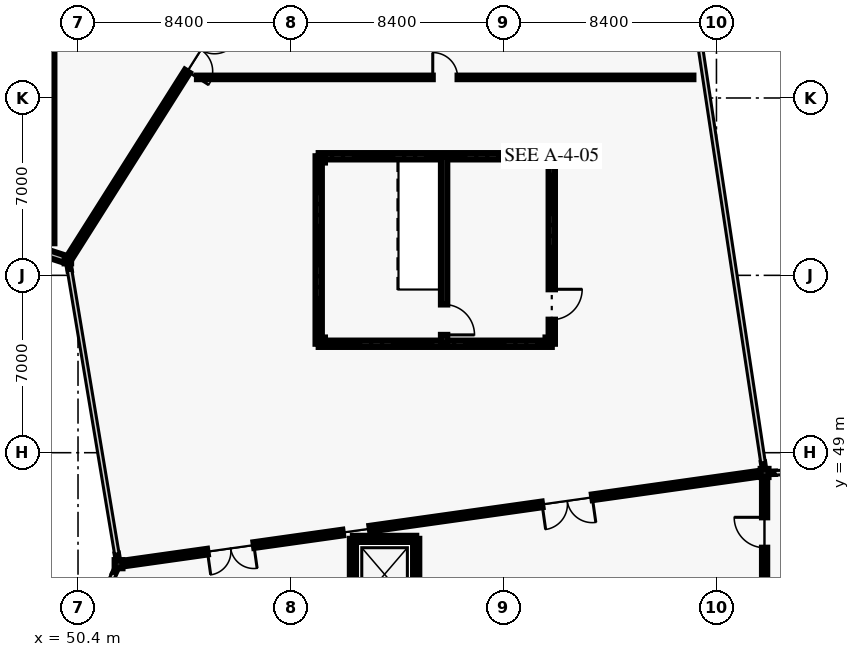
"""IFC4 building model, lengths in metres.
Left out: names, types, materials, properties, quantities, classifications, styles, units other than length and angle.
Written with IfcOpenShell. Run it as: python <this file> out.ifc"""

import sys

from ifc_helpers import new_model, si_unit, direction, frame, frame_2d, origin, origin_2d, place, context, subcontext, project, spatial, rectangle, i_section, extrude, element, fill, save


model = new_model("IFC4")
c1 = context("Model", 3, precision=1e-05, world=origin(), true_north=direction((0.0, 1.0)))
c2 = subcontext(c1, "Body", "Model", "MODEL_VIEW")
j1 = project(units=[si_unit("LENGTHUNIT", "METRE"), si_unit("PLANEANGLEUNIT", "RADIAN")], contexts=[c1])
p1 = place(None, origin())
s1 = spatial("IfcSite", under=j1, at=p1, CompositionType="ELEMENT")
p2 = place(p1, origin())
s2 = spatial("IfcBuilding", under=s1, at=p2, CompositionType="ELEMENT")
p3 = place(p2, frame((0.0, 0.0, 15.0)))
s3 = spatial("IfcBuildingStorey", under=s2, at=p3, CompositionType="ELEMENT", Elevation=15.0)
p4 = place(p3, frame((50.0, 56.6, 0.0), z_axis=(0.0, 0.0, 1.0), x_axis=(1.0, 0.0, 0.0)))
e1 = element("IfcColumn", 1, at=p4, inside=s3, PredefinedType="COLUMN", context=c2, shape_type="SweptSolid", body=[
    extrude(i_section(OverallWidth=0.254, OverallDepth=0.254, WebThickness=0.009, FlangeThickness=0.014, FilletRadius=0.013, at=origin_2d()), origin(), (0.0, 0.0, 1.0), 4.8),
])
for number, where, z_axis, x_axis in (
    (2, (52.0, 44.6, 0.0), (0.0, 0.0, 1.0), (1.0, 0.0, 0.0)),
    (3, (77.5, 48.2, 0.0), (0.0, 0.0, 1.0), (1.0, 0.0, 0.0)),
):
    element("IfcColumn", number, at=place(p3, frame(where, z_axis=z_axis, x_axis=x_axis)), inside=s3, PredefinedType="COLUMN", context=c2, shape_type="SweptSolid", body=[
        extrude(i_section(OverallWidth=0.309, OverallDepth=0.321, WebThickness=0.014, FlangeThickness=0.022, FilletRadius=0.017, at=origin_2d()), origin(), (0.0, 0.0, 1.0), 4.8),
    ])
for number, where, z_axis, x_axis in (
    (4, (60.02, 53.42, 0.0), (0.0, 0.0, 1.0), (1.0, 0.0, 0.0)),
    (5, (68.98, 53.42, 0.0), (0.0, 0.0, 1.0), (1.0, 0.0, 0.0)),
    (6, (68.98, 60.58, 0.0), (0.0, 0.0, 1.0), (1.0, 0.0, 0.0)),
    (7, (60.02, 60.58, 0.0), (0.0, 0.0, 1.0), (1.0, 0.0, 0.0)),
):
    element("IfcColumn", number, at=place(p3, frame(where, z_axis=z_axis, x_axis=x_axis)), inside=s3, PredefinedType="COLUMN", context=c2, shape_type="SweptSolid", body=[
        extrude(i_section(OverallWidth=0.254, OverallDepth=0.254, WebThickness=0.009, FlangeThickness=0.014, FilletRadius=0.013, at=origin_2d()), origin(), (0.0, 0.0, 1.0), 4.8),
    ])
p5 = place(p3, frame((51.825, 44.229, 0.0), z_axis=(0.0, 0.0, 1.0), x_axis=(0.425224932958, 0.905087706463, 0.0)))
e8 = element("IfcWall", 8, at=p5, inside=s3, PredefinedType="SOLIDWALL", context=c2, shape_type="SweptSolid", body=[
    extrude(rectangle(XDim=0.308, YDim=0.095, at=frame_2d((0.154, 0.0))), origin(), (0.0, 0.0, 1.0), 3.62),
])
p6 = place(p3, frame((77.602, 48.202, 0.0), z_axis=(0.0, 0.0, 1.0), x_axis=(0.999735659566, 0.022991541735, 0.0)))
e9 = element("IfcWall", 9, at=p6, inside=s3, PredefinedType="SOLIDWALL", context=c2, shape_type="SweptSolid", body=[
    extrude(rectangle(XDim=0.308, YDim=0.095, at=frame_2d((0.154, 0.0))), origin(), (0.0, 0.0, 1.0), 3.62),
])
for number, where, z_axis, x_axis in (
    (10, (51.983, 44.7, 0.0), (0.0, 0.0, 1.0), (-0.166, 0.986, 0.0)),
    (11, (50.068, 56.196, 0.0), (0.0, 0.0, 1.0), (-0.166, 0.986, 0.0)),
):
    element("IfcWall", number, at=place(p3, frame(where, z_axis=z_axis, x_axis=x_axis)), inside=s3, PredefinedType="SOLIDWALL", context=c2, shape_type="SweptSolid", body=[
        extrude(rectangle(XDim=0.308, YDim=0.095, at=frame_2d((0.154, 0.0))), origin(), (0.0, 0.0, 1.0), 3.62),
    ])
p7 = place(p3, frame((77.439, 48.605, 0.0), z_axis=(0.0, 0.0, 1.0), x_axis=(0.15008766182, -0.988672692942, 0.0)))
e12 = element("IfcWall", 12, at=p7, inside=s3, PredefinedType="SOLIDWALL", context=c2, shape_type="SweptSolid", body=[
    extrude(rectangle(XDim=0.307, YDim=0.095, at=frame_2d((0.154, 0.0))), origin(), (0.0, 0.0, 1.0), 3.62),
])
p8 = place(p3, frame((49.943, 56.619, 0.0), z_axis=(0.0, 0.0, 1.0), x_axis=(-0.951067694824, 0.308982588283, 0.0)))
e13 = element("IfcWall", 13, at=p8, inside=s3, PredefinedType="SOLIDWALL", context=c2, shape_type="SweptSolid", body=[
    extrude(rectangle(XDim=24.86, YDim=0.29, at=frame_2d((12.43, 0.0))), origin(), (0.0, 0.0, 1.0), 3.62),
])
p9 = place(p3, frame((77.5, 43.5, 0.0), z_axis=(0.0, 0.0, 1.0), x_axis=(0.0, 1.0, 0.0)))
e14 = element("IfcWall", 14, at=p9, inside=s3, PredefinedType="SOLIDWALL", context=c2, shape_type="SweptSolid", body=[
    extrude(rectangle(XDim=4.7, YDim=0.205, at=frame_2d((2.35, 0.0))), origin(), (0.0, 0.0, 1.0), 3.32),
])
p10 = place(p9, frame((1.75, 0.0, 0.0)))
e15 = element("IfcOpeningElement", 15, at=p10, cuts=e14, PredefinedType="OPENING", context=c2, shape_type="SweptSolid", body=[
    extrude(rectangle(XDim=1.2, YDim=2.2, at=frame_2d((0.6, 1.1))), frame((0.0, 0.113, 0.0), z_axis=(0.0, -1.0, 0.0), x_axis=(1.0, 0.0, 0.0)), (0.0, 0.0, 1.0), 0.225),
])
p11 = place(p3, frame((77.5, 48.2, 0.0), z_axis=(0.0, 0.0, 1.0), x_axis=(-0.990181159322, -0.139790098807, 0.0)))
e16 = element("IfcWall", 16, at=p11, inside=s3, PredefinedType="SOLIDWALL", context=c2, shape_type="SweptSolid", body=[
    extrude(rectangle(XDim=15.738, YDim=0.225, at=frame_2d((7.869, 0.0))), origin(), (0.0, 0.0, 1.0), 4.02),
])
p12 = place(p11, frame((6.869, 0.0, 0.0)))
e17 = element("IfcOpeningElement", 17, at=p12, cuts=e16, PredefinedType="OPENING", context=c2, shape_type="SweptSolid", body=[
    extrude(rectangle(XDim=2.0, YDim=2.5, at=frame_2d((1.0, 1.25))), frame((0.0, 0.123, 0.0), z_axis=(0.0, -1.0, 0.0), x_axis=(1.0, 0.0, 0.0)), (0.0, 0.0, 1.0), 0.245),
])
p13 = place(p3, frame((60.85, 45.849, 0.0), z_axis=(0.0, 0.0, 1.0), x_axis=(-0.990187360524, -0.139746166523, 0.0)))
e18 = element("IfcWall", 18, at=p13, inside=s3, PredefinedType="SOLIDWALL", context=c2, shape_type="SweptSolid", body=[
    extrude(rectangle(XDim=8.938, YDim=0.225, at=frame_2d((4.469, 0.0))), origin(), (0.0, 0.0, 1.0), 4.02),
])
p14 = place(p13, frame((3.544, 0.0, 0.0)))
e19 = element("IfcOpeningElement", 19, at=p14, cuts=e18, PredefinedType="OPENING", context=c2, shape_type="SweptSolid", body=[
    extrude(rectangle(XDim=1.85, YDim=2.4, at=frame_2d((0.925, 1.2))), frame((0.0, 0.123, 0.0), z_axis=(0.0, -1.0, 0.0), x_axis=(1.0, 0.0, 0.0)), (0.0, 0.0, 1.0), 0.245),
])
p15 = place(p3, frame((60.5, 73.2, 0.0), z_axis=(0.0, 0.0, 1.0), x_axis=(-0.534570878454, -0.845123645338, 0.0)))
e20 = element("IfcWall", 20, at=p15, inside=s3, PredefinedType="SOLIDWALL", context=c2, shape_type="SweptSolid", body=[
    extrude(rectangle(XDim=19.642, YDim=0.225, at=frame_2d((9.821, 0.0))), origin(), (0.0, 0.0, 1.0), 4.02),
])
p16 = place(p15, frame((8.821, 0.0, 0.0)))
e21 = element("IfcOpeningElement", 21, at=p16, cuts=e20, PredefinedType="OPENING", context=c2, shape_type="SweptSolid", body=[
    extrude(rectangle(XDim=2.0, YDim=2.5, at=frame_2d((1.0, 1.25))), frame((0.0, 0.123, 0.0), z_axis=(0.0, -1.0, 0.0), x_axis=(1.0, 0.0, 0.0)), (0.0, 0.0, 1.0), 0.245),
])
p17 = place(p3, frame((55.095, 63.813, 0.0), z_axis=(0.0, 0.0, 1.0), x_axis=(1.0, 0.0, 0.0)))
e22 = element("IfcWall", 22, at=p17, inside=s3, PredefinedType="PARTITIONING", context=c2, shape_type="SweptSolid", body=[
    extrude(rectangle(XDim=19.595, YDim=0.14, at=frame_2d((9.797, 0.0))), origin(), (0.0, 0.0, 1.0), 3.32),
])
p18 = place(p17, frame((9.307, 0.0, 0.0)))
e23 = element("IfcOpeningElement", 23, at=p18, cuts=e22, PredefinedType="OPENING", context=c2, shape_type="SweptSolid", body=[
    extrude(rectangle(XDim=0.98, YDim=2.15, at=frame_2d((0.49, 1.075))), frame((0.0, 0.08, 0.0), z_axis=(0.0, -1.0, 0.0), x_axis=(1.0, 0.0, 0.0)), (0.0, 0.0, 1.0), 0.16),
])
p19 = place(p3, frame((49.403, 57.267, 0.0), z_axis=(0.0, 0.0, 1.0), x_axis=(0.0, 1.0, 0.0)))
e24 = element("IfcWall", 24, at=p19, inside=s3, PredefinedType="PARTITIONING", context=c2, shape_type="SweptSolid", body=[
    extrude(rectangle(XDim=24.53, YDim=0.13, at=frame_2d((12.265, 0.0))), origin(), (0.0, 0.0, 1.0), 3.32),
])
p20 = place(p19, frame((11.79, 0.0, 0.0)))
e25 = element("IfcOpeningElement", 25, at=p20, cuts=e24, PredefinedType="OPENING", context=c2, shape_type="SweptSolid", body=[
    extrude(rectangle(XDim=0.95, YDim=2.15, at=frame_2d((0.475, 1.075))), frame((0.0, 0.075, 0.0), z_axis=(0.0, -1.0, 0.0), x_axis=(1.0, 0.0, 0.0)), (0.0, 0.0, 1.0), 0.15),
])
p21 = place(p3, frame((59.9, 53.3, 0.0), z_axis=(0.0, 0.0, 1.0), x_axis=(0.0, 1.0, 0.0)))
e26 = element("IfcWall", 26, at=p21, inside=s3, PredefinedType="SHEAR", context=c2, shape_type="SweptSolid", body=[
    extrude(rectangle(XDim=7.4, YDim=0.25, at=frame_2d((3.7, 0.0))), origin(), (0.0, 0.0, 1.0), 4.56),
])
for number, where, z_axis, x_axis in (
    (27, (59.9, 60.7, 0.0), (0.0, 0.0, 1.0), (1.0, 0.0, 0.0)),
    (28, (69.1, 53.3, 0.0), (0.0, 0.0, 1.0), (-1.0, 0.0, 0.0)),
):
    element("IfcWall", number, at=place(p3, frame(where, z_axis=z_axis, x_axis=x_axis)), inside=s3, PredefinedType="SHEAR", context=c2, shape_type="SweptSolid", body=[
        extrude(rectangle(XDim=9.2, YDim=0.25, at=frame_2d((4.6, 0.0))), origin(), (0.0, 0.0, 1.0), 4.56),
    ])
p22 = place(p3, frame((69.1, 60.7, 0.0), z_axis=(0.0, 0.0, 1.0), x_axis=(0.0, -1.0, 0.0)))
e29 = element("IfcWall", 29, at=p22, inside=s3, PredefinedType="SHEAR", context=c2, shape_type="SweptSolid", body=[
    extrude(rectangle(XDim=7.4, YDim=0.25, at=frame_2d((3.7, 0.0))), origin(), (0.0, 0.0, 1.0), 4.56),
])
p23 = place(p22, frame((5.25, 0.0, 0.0)))
e30 = element("IfcOpeningElement", 30, at=p23, cuts=e29, PredefinedType="OPENING", context=c2, shape_type="SweptSolid", body=[
    extrude(rectangle(XDim=1.2, YDim=2.2, at=frame_2d((0.6, 1.1))), frame((0.0, 0.135, 0.0), z_axis=(0.0, -1.0, 0.0), x_axis=(1.0, 0.0, 0.0)), (0.0, 0.0, 1.0), 0.27),
])
p24 = place(p3, frame((64.85, 60.7, 0.0), z_axis=(0.0, 0.0, 1.0), x_axis=(0.0, -1.0, 0.0)))
e31 = element("IfcWall", 31, at=p24, inside=s3, PredefinedType="SHEAR", context=c2, shape_type="SweptSolid", body=[
    extrude(rectangle(XDim=7.4, YDim=0.25, at=frame_2d((3.7, 0.0))), origin(), (0.0, 0.0, 1.0), 4.56),
])
p25 = place(p24, frame((5.85, 0.0, 0.0)))
e32 = element("IfcOpeningElement", 32, at=p25, cuts=e31, PredefinedType="OPENING", context=c2, shape_type="SweptSolid", body=[
    extrude(rectangle(XDim=1.2, YDim=2.2, at=frame_2d((0.6, 1.1))), frame((0.0, 0.135, 0.0), z_axis=(0.0, -1.0, 0.0), x_axis=(1.0, 0.0, 0.0)), (0.0, 0.0, 1.0), 0.27),
])
p26 = place(p3, frame((61.25, 45.6, 0.0), z_axis=(0.0, 0.0, 1.0), x_axis=(1.0, 0.0, 0.0)))
e33 = element("IfcWall", 33, at=p26, inside=s3, PredefinedType="SHEAR", context=c2, shape_type="SweptSolid", body=[
    extrude(rectangle(XDim=2.5, YDim=0.24, at=frame_2d((1.25, 0.0))), origin(), (0.0, 0.0, 1.0), 4.56),
])
for number, where, z_axis, x_axis in (
    (34, (63.75, 45.6, 0.0), (0.0, 0.0, 1.0), (0.0, -1.0, 0.0)),
    (35, (61.25, 42.8, 0.0), (0.0, 0.0, 1.0), (0.0, 1.0, 0.0)),
):
    element("IfcWall", number, at=place(p3, frame(where, z_axis=z_axis, x_axis=x_axis)), inside=s3, PredefinedType="SHEAR", context=c2, shape_type="SweptSolid", body=[
        extrude(rectangle(XDim=2.8, YDim=0.24, at=frame_2d((1.4, 0.0))), origin(), (0.0, 0.0, 1.0), 4.56),
    ])
p27 = place(p10, origin())
e36 = element("IfcDoor", 36, at=p27, inside=s3, OperationType="SINGLE_SWING_RIGHT", PredefinedType="DOOR", context=c2, shape_type="SweptSolid", body=[
    extrude(rectangle(XDim=1.2, YDim=2.2, at=frame_2d((0.6, 1.1))), frame((0.0, 0.025, 0.0), z_axis=(0.0, -1.0, 0.0), x_axis=(1.0, 0.0, 0.0)), (0.0, 0.0, 1.0), 0.05),
])
fill(e15, e36)
p28 = place(p12, origin())
e37 = element("IfcDoor", 37, at=p28, inside=s3, OperationType="DOUBLE_DOOR_SINGLE_SWING", PredefinedType="DOOR", context=c2, shape_type="SweptSolid", body=[
    extrude(rectangle(XDim=2.0, YDim=2.5, at=frame_2d((1.0, 1.25))), frame((0.0, 0.025, 0.0), z_axis=(0.0, -1.0, 0.0), x_axis=(1.0, 0.0, 0.0)), (0.0, 0.0, 1.0), 0.05),
])
fill(e17, e37)
p29 = place(p14, origin())
e38 = element("IfcDoor", 38, at=p29, inside=s3, OperationType="DOUBLE_DOOR_SINGLE_SWING", PredefinedType="DOOR", context=c2, shape_type="SweptSolid", body=[
    extrude(rectangle(XDim=1.85, YDim=2.4, at=frame_2d((0.925, 1.2))), frame((0.0, 0.025, 0.0), z_axis=(0.0, -1.0, 0.0), x_axis=(1.0, 0.0, 0.0)), (0.0, 0.0, 1.0), 0.05),
])
fill(e19, e38)
p30 = place(p16, origin())
e39 = element("IfcDoor", 39, at=p30, inside=s3, OperationType="DOUBLE_DOOR_SINGLE_SWING", PredefinedType="DOOR", context=c2, shape_type="SweptSolid", body=[
    extrude(rectangle(XDim=2.0, YDim=2.5, at=frame_2d((1.0, 1.25))), frame((0.0, 0.025, 0.0), z_axis=(0.0, -1.0, 0.0), x_axis=(1.0, 0.0, 0.0)), (0.0, 0.0, 1.0), 0.05),
])
fill(e21, e39)
p31 = place(p18, origin())
e40 = element("IfcDoor", 40, at=p31, inside=s3, OperationType="SINGLE_SWING_LEFT", PredefinedType="DOOR", context=c2, shape_type="SweptSolid", body=[
    extrude(rectangle(XDim=0.98, YDim=2.15, at=frame_2d((0.49, 1.075))), frame((0.0, 0.025, 0.0), z_axis=(0.0, -1.0, 0.0), x_axis=(1.0, 0.0, 0.0)), (0.0, 0.0, 1.0), 0.05),
])
fill(e23, e40)
p32 = place(p23, origin())
e41 = element("IfcDoor", 41, at=p32, inside=s3, OperationType="SINGLE_SWING_LEFT", PredefinedType="DOOR", context=c2, shape_type="SweptSolid", body=[
    extrude(rectangle(XDim=1.2, YDim=2.2, at=frame_2d((0.6, 1.1))), frame((0.0, 0.025, 0.0), z_axis=(0.0, -1.0, 0.0), x_axis=(1.0, 0.0, 0.0)), (0.0, 0.0, 1.0), 0.05),
])
fill(e30, e41)
p33 = place(p25, origin())
e42 = element("IfcDoor", 42, at=p33, inside=s3, OperationType="SINGLE_SWING_RIGHT", PredefinedType="DOOR", context=c2, shape_type="SweptSolid", body=[
    extrude(rectangle(XDim=1.2, YDim=2.2, at=frame_2d((0.6, 1.1))), frame((0.0, 0.025, 0.0), z_axis=(0.0, -1.0, 0.0), x_axis=(1.0, 0.0, 0.0)), (0.0, 0.0, 1.0), 0.05),
])
fill(e32, e42)
save(model, sys.argv[1])
